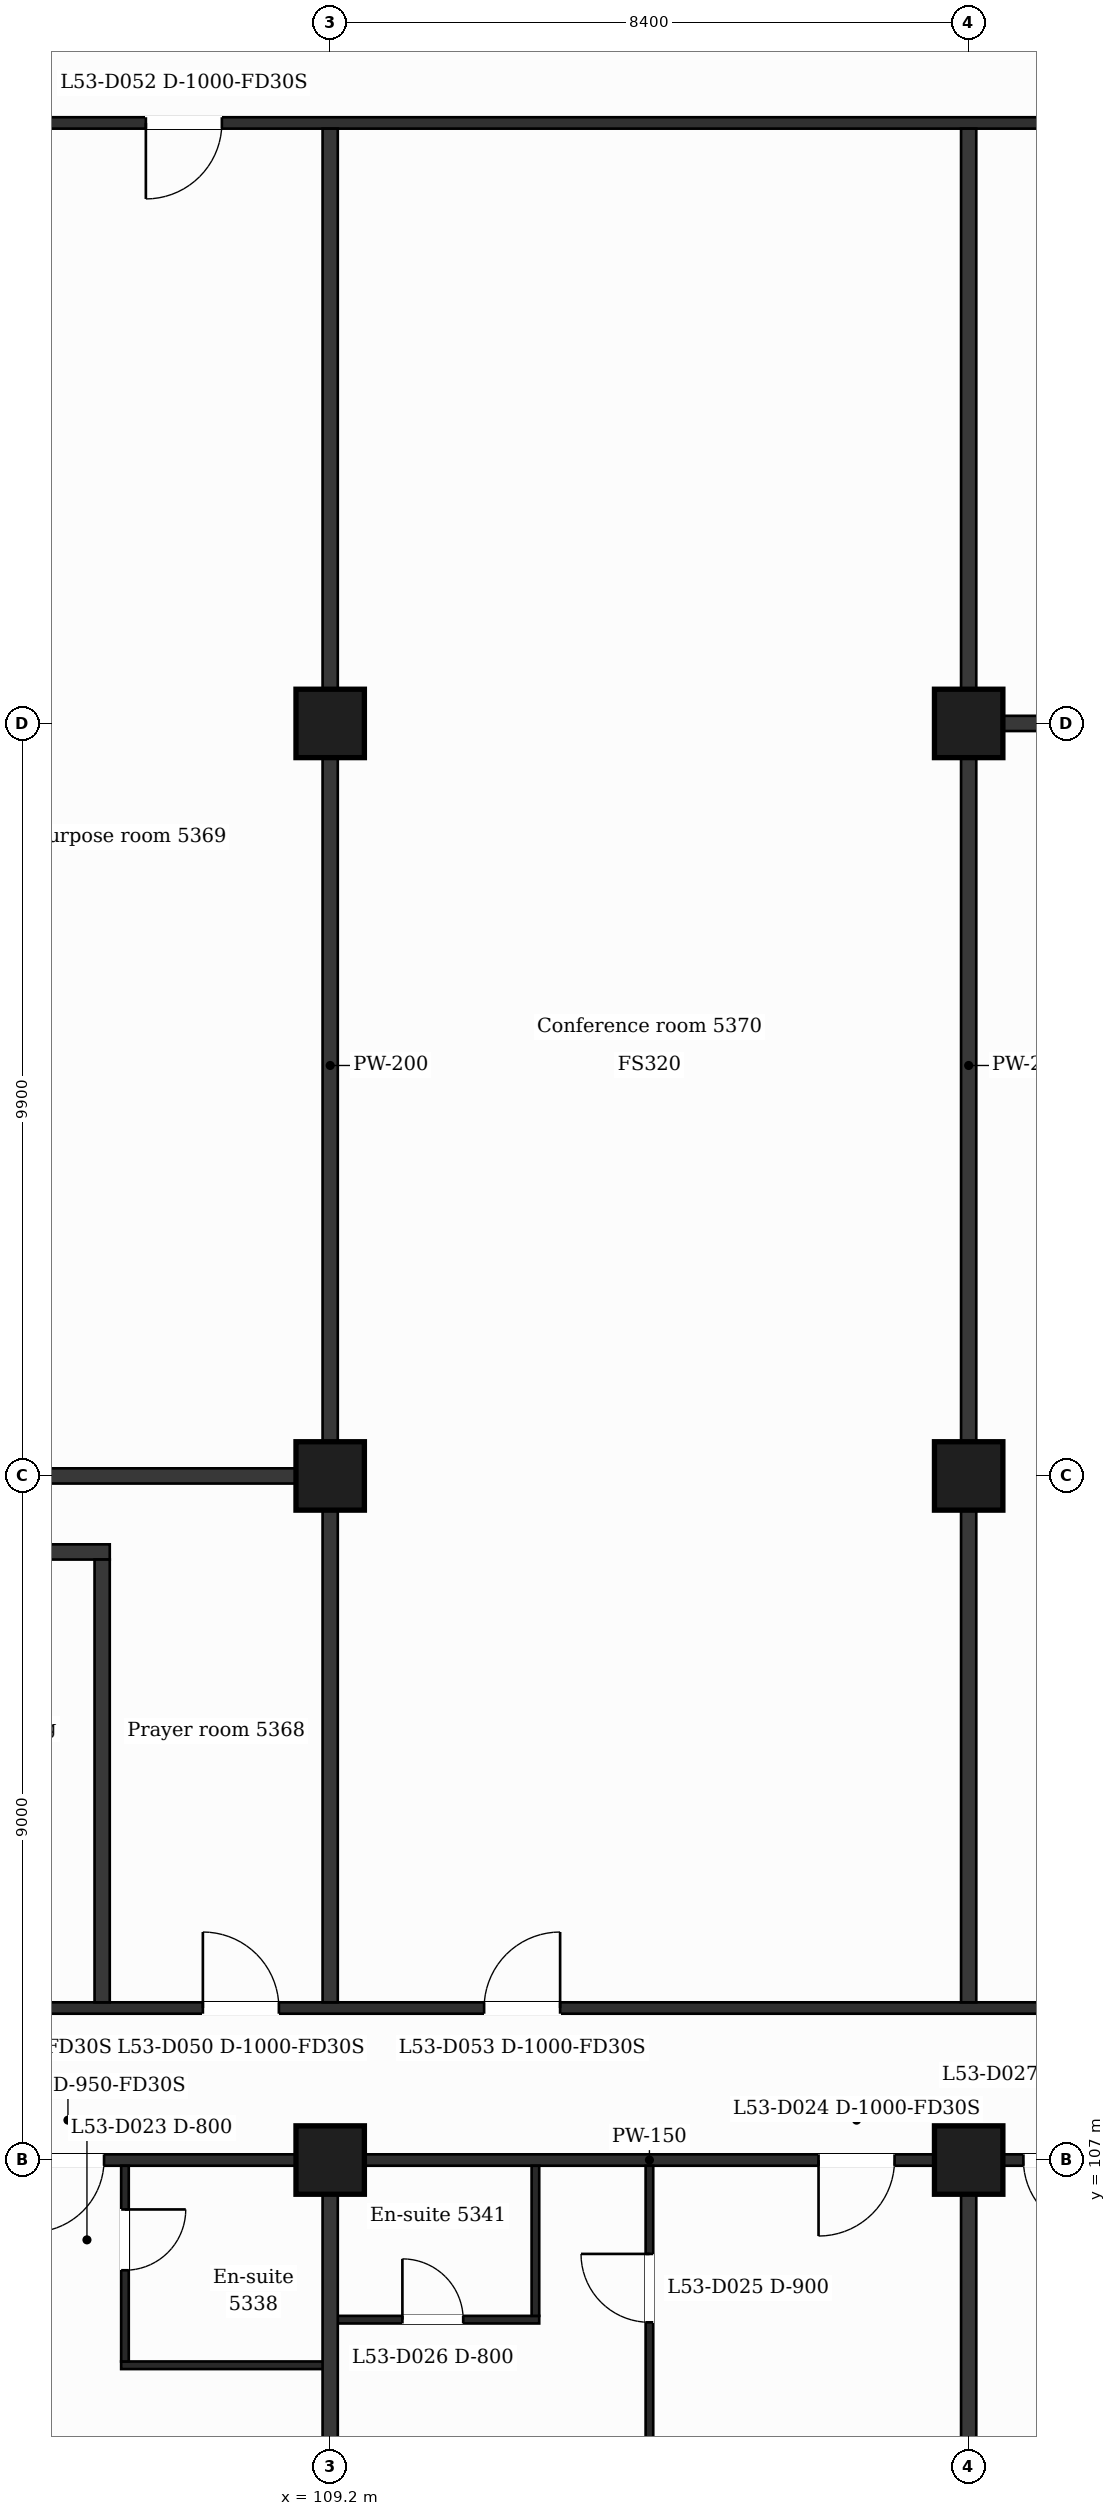
"""IFC4 building model, lengths in metres.
Left out: names, types, materials, properties, quantities, classifications, styles, units other than length and angle.
Written with IfcOpenShell. Run it as: python <this file> out.ifc"""

import sys

from ifc_helpers import new_model, si_unit, direction, frame, frame_2d, origin, origin_2d, place, context, subcontext, project, spatial, rectangle, extrude, element, fill, save


model = new_model("IFC4")
c1 = context("Model", 3, precision=1e-05, world=origin(), true_north=direction((0.0, 1.0)))
c2 = subcontext(c1, "Body", "Model", "MODEL_VIEW")
j1 = project(units=[si_unit("LENGTHUNIT", "METRE"), si_unit("PLANEANGLEUNIT", "RADIAN")], contexts=[c1])
p1 = place(None, origin())
s1 = spatial("IfcSite", under=j1, at=p1, CompositionType="ELEMENT")
p2 = place(p1, origin())
s2 = spatial("IfcBuilding", under=s1, at=p2, CompositionType="ELEMENT")
p3 = place(p2, frame((0.0, 0.0, 220.7)))
s3 = spatial("IfcBuildingStorey", under=s2, at=p3, CompositionType="ELEMENT", Elevation=220.7)
for number, where, z_axis, x_axis in (
    (1, (109.2, 107.0, 0.0), (0.0, 0.0, 1.0), (1.0, 0.0, 0.0)),
    (2, (117.6, 107.0, 0.0), (0.0, 0.0, 1.0), (1.0, 0.0, 0.0)),
    (3, (109.2, 116.0, 0.0), (0.0, 0.0, 1.0), (1.0, 0.0, 0.0)),
    (4, (117.6, 116.0, 0.0), (0.0, 0.0, 1.0), (1.0, 0.0, 0.0)),
    (5, (109.2, 125.9, 0.0), (0.0, 0.0, 1.0), (1.0, 0.0, 0.0)),
    (6, (117.6, 125.9, 0.0), (0.0, 0.0, 1.0), (1.0, 0.0, 0.0)),
):
    element("IfcColumn", number, at=place(p3, frame(where, z_axis=z_axis, x_axis=x_axis)), inside=s3, PredefinedType="COLUMN", context=c2, shape_type="SweptSolid", body=[
        extrude(rectangle(XDim=0.9, YDim=0.9, at=origin_2d()), origin(), (0.0, 0.0, 1.0), 3.7),
    ])
p4 = place(p3, frame((106.45, 104.3, 0.0), z_axis=(0.0, 0.0, 1.0), x_axis=(1.0, 0.0, 0.0)))
e7 = element("IfcWall", 7, at=p4, inside=s3, PredefinedType="PARTITIONING", context=c2, shape_type="SweptSolid", body=[
    extrude(rectangle(XDim=2.75, YDim=0.1, at=frame_2d((1.375, 0.0))), origin(), (0.0, 0.0, 1.0), 3.38),
])
p5 = place(p3, frame((109.2, 104.9, 0.0), z_axis=(0.0, 0.0, 1.0), x_axis=(1.0, 0.0, 0.0)))
e8 = element("IfcWall", 8, at=p5, inside=s3, PredefinedType="PARTITIONING", context=c2, shape_type="SweptSolid", body=[
    extrude(rectangle(XDim=2.75, YDim=0.1, at=frame_2d((1.375, 0.0))), origin(), (0.0, 0.0, 1.0), 3.38),
])
p6 = place(p5, frame((0.95, 0.0, 0.0)))
e9 = element("IfcOpeningElement", 9, at=p6, cuts=e8, PredefinedType="OPENING", context=c2, shape_type="SweptSolid", body=[
    extrude(rectangle(XDim=0.8, YDim=2.1, at=frame_2d((0.4, 1.05))), frame((0.0, 0.06, 0.0), z_axis=(0.0, -1.0, 0.0), x_axis=(1.0, 0.0, 0.0)), (0.0, 0.0, 1.0), 0.12),
])
p7 = place(p3, frame((87.018, 107.0, 0.0), z_axis=(0.0, 0.0, 1.0), x_axis=(1.0, 0.0, 0.0)))
e10 = element("IfcWall", 10, at=p7, inside=s3, PredefinedType="PARTITIONING", context=c2, shape_type="SweptSolid", body=[
    extrude(rectangle(XDim=52.765, YDim=0.15, at=frame_2d((26.382, 0.0))), origin(), (0.0, 0.0, 1.0), 3.38),
])
p8 = place(p7, frame((0.707, 0.0, 0.0)))
e11 = element("IfcOpeningElement", 11, at=p8, cuts=e10, PredefinedType="OPENING", context=c2, shape_type="SweptSolid", body=[
    extrude(rectangle(XDim=0.95, YDim=2.1, at=frame_2d((0.475, 1.05))), frame((0.0, 0.085, 0.0), z_axis=(0.0, -1.0, 0.0), x_axis=(1.0, 0.0, 0.0)), (0.0, 0.0, 1.0), 0.17),
])
p9 = place(p7, frame((6.894, 0.0, 0.0)))
e12 = element("IfcOpeningElement", 12, at=p9, cuts=e10, PredefinedType="OPENING", context=c2, shape_type="SweptSolid", body=[
    extrude(rectangle(XDim=0.95, YDim=2.1, at=frame_2d((0.475, 1.05))), frame((0.0, 0.085, 0.0), z_axis=(0.0, -1.0, 0.0), x_axis=(1.0, 0.0, 0.0)), (0.0, 0.0, 1.0), 0.17),
])
p10 = place(p7, frame((15.662, 0.0, 0.0)))
e13 = element("IfcOpeningElement", 13, at=p10, cuts=e10, PredefinedType="OPENING", context=c2, shape_type="SweptSolid", body=[
    extrude(rectangle(XDim=0.95, YDim=2.1, at=frame_2d((0.475, 1.05))), frame((0.0, 0.085, 0.0), z_axis=(0.0, -1.0, 0.0), x_axis=(1.0, 0.0, 0.0)), (0.0, 0.0, 1.0), 0.17),
])
p11 = place(p7, frame((18.257, 0.0, 0.0)))
e14 = element("IfcOpeningElement", 14, at=p11, cuts=e10, PredefinedType="OPENING", context=c2, shape_type="SweptSolid", body=[
    extrude(rectangle(XDim=0.95, YDim=2.1, at=frame_2d((0.475, 1.05))), frame((0.0, 0.085, 0.0), z_axis=(0.0, -1.0, 0.0), x_axis=(1.0, 0.0, 0.0)), (0.0, 0.0, 1.0), 0.17),
])
p12 = place(p7, frame((28.607, 0.0, 0.0)))
e15 = element("IfcOpeningElement", 15, at=p12, cuts=e10, PredefinedType="OPENING", context=c2, shape_type="SweptSolid", body=[
    extrude(rectangle(XDim=1.0, YDim=2.1, at=frame_2d((0.5, 1.05))), frame((0.0, 0.085, 0.0), z_axis=(0.0, -1.0, 0.0), x_axis=(1.0, 0.0, 0.0)), (0.0, 0.0, 1.0), 0.17),
])
p13 = place(p7, frame((31.302, 0.0, 0.0)))
e16 = element("IfcOpeningElement", 16, at=p13, cuts=e10, PredefinedType="OPENING", context=c2, shape_type="SweptSolid", body=[
    extrude(rectangle(XDim=0.95, YDim=2.1, at=frame_2d((0.475, 1.05))), frame((0.0, 0.085, 0.0), z_axis=(0.0, -1.0, 0.0), x_axis=(1.0, 0.0, 0.0)), (0.0, 0.0, 1.0), 0.17),
])
p14 = place(p7, frame((35.057, 0.0, 0.0)))
e17 = element("IfcOpeningElement", 17, at=p14, cuts=e10, PredefinedType="OPENING", context=c2, shape_type="SweptSolid", body=[
    extrude(rectangle(XDim=0.95, YDim=2.1, at=frame_2d((0.475, 1.05))), frame((0.0, 0.085, 0.0), z_axis=(0.0, -1.0, 0.0), x_axis=(1.0, 0.0, 0.0)), (0.0, 0.0, 1.0), 0.17),
])
p15 = place(p7, frame((41.957, 0.0, 0.0)))
e18 = element("IfcOpeningElement", 18, at=p15, cuts=e10, PredefinedType="OPENING", context=c2, shape_type="SweptSolid", body=[
    extrude(rectangle(XDim=0.95, YDim=2.1, at=frame_2d((0.475, 1.05))), frame((0.0, 0.085, 0.0), z_axis=(0.0, -1.0, 0.0), x_axis=(1.0, 0.0, 0.0)), (0.0, 0.0, 1.0), 0.17),
])
p16 = place(p7, frame((45.712, 0.0, 0.0)))
e19 = element("IfcOpeningElement", 19, at=p16, cuts=e10, PredefinedType="OPENING", context=c2, shape_type="SweptSolid", body=[
    extrude(rectangle(XDim=1.0, YDim=2.1, at=frame_2d((0.5, 1.05))), frame((0.0, 0.085, 0.0), z_axis=(0.0, -1.0, 0.0), x_axis=(1.0, 0.0, 0.0)), (0.0, 0.0, 1.0), 0.17),
])
p17 = place(p7, frame((48.974, 0.0, 0.0)))
e20 = element("IfcOpeningElement", 20, at=p17, cuts=e10, PredefinedType="OPENING", context=c2, shape_type="SweptSolid", body=[
    extrude(rectangle(XDim=0.95, YDim=2.1, at=frame_2d((0.475, 1.05))), frame((0.0, 0.085, 0.0), z_axis=(0.0, -1.0, 0.0), x_axis=(1.0, 0.0, 0.0)), (0.0, 0.0, 1.0), 0.17),
])
p18 = place(p3, frame((100.725, 109.0, 0.0), z_axis=(0.0, 0.0, 1.0), x_axis=(1.0, 0.0, 0.0)))
e21 = element("IfcWall", 21, at=p18, inside=s3, PredefinedType="PARTITIONING", context=c2, shape_type="SweptSolid", body=[
    extrude(rectangle(XDim=25.35, YDim=0.15, at=frame_2d((12.675, 0.0))), origin(), (0.0, 0.0, 1.0), 3.38),
])
p19 = place(p18, frame((6.8, 0.0, 0.0)))
e22 = element("IfcOpeningElement", 22, at=p19, cuts=e21, PredefinedType="OPENING", context=c2, shape_type="SweptSolid", body=[
    extrude(rectangle(XDim=1.0, YDim=2.1, at=frame_2d((0.5, 1.05))), frame((0.0, 0.085, 0.0), z_axis=(0.0, -1.0, 0.0), x_axis=(1.0, 0.0, 0.0)), (0.0, 0.0, 1.0), 0.17),
])
p20 = place(p18, frame((3.475, 0.0, 0.0)))
e23 = element("IfcOpeningElement", 23, at=p20, cuts=e21, PredefinedType="OPENING", context=c2, shape_type="SweptSolid", body=[
    extrude(rectangle(XDim=1.0, YDim=2.1, at=frame_2d((0.5, 1.05))), frame((0.0, 0.085, 0.0), z_axis=(0.0, -1.0, 0.0), x_axis=(1.0, 0.0, 0.0)), (0.0, 0.0, 1.0), 0.17),
])
p21 = place(p18, frame((10.5, 0.0, 0.0)))
e24 = element("IfcOpeningElement", 24, at=p21, cuts=e21, PredefinedType="OPENING", context=c2, shape_type="SweptSolid", body=[
    extrude(rectangle(XDim=1.0, YDim=2.1, at=frame_2d((0.5, 1.05))), frame((0.0, 0.085, 0.0), z_axis=(0.0, -1.0, 0.0), x_axis=(1.0, 0.0, 0.0)), (0.0, 0.0, 1.0), 0.17),
])
p22 = place(p18, frame((19.375, 0.0, 0.0)))
e25 = element("IfcOpeningElement", 25, at=p22, cuts=e21, PredefinedType="OPENING", context=c2, shape_type="SweptSolid", body=[
    extrude(rectangle(XDim=1.0, YDim=2.1, at=frame_2d((0.5, 1.05))), frame((0.0, 0.085, 0.0), z_axis=(0.0, -1.0, 0.0), x_axis=(1.0, 0.0, 0.0)), (0.0, 0.0, 1.0), 0.17),
])
p23 = place(p3, frame((103.2, 115.0, 0.0), z_axis=(0.0, 0.0, 1.0), x_axis=(1.0, 0.0, 0.0)))
e26 = element("IfcWall", 26, at=p23, inside=s3, PredefinedType="PARTITIONING", context=c2, shape_type="SweptSolid", body=[
    extrude(rectangle(XDim=3.1, YDim=0.2, at=frame_2d((1.55, 0.0))), origin(), (0.0, 0.0, 1.0), 3.38),
])
for number, where, z_axis, x_axis in (
    (27, (103.2, 116.0, 0.0), (0.0, 0.0, 1.0), (1.0, 0.0, 0.0)),
    (28, (117.6, 125.9, 0.0), (0.0, 0.0, 1.0), (1.0, 0.0, 0.0)),
):
    element("IfcWall", number, at=place(p3, frame(where, z_axis=z_axis, x_axis=x_axis)), inside=s3, PredefinedType="PARTITIONING", context=c2, shape_type="SweptSolid", body=[
        extrude(rectangle(XDim=6.0, YDim=0.2, at=frame_2d((3.0, 0.0))), origin(), (0.0, 0.0, 1.0), 3.38),
    ])
p24 = place(p3, frame((100.725, 133.8, 0.0), z_axis=(0.0, 0.0, 1.0), x_axis=(1.0, 0.0, 0.0)))
e29 = element("IfcWall", 29, at=p24, inside=s3, PredefinedType="PARTITIONING", context=c2, shape_type="SweptSolid", body=[
    extrude(rectangle(XDim=25.35, YDim=0.15, at=frame_2d((12.675, 0.0))), origin(), (0.0, 0.0, 1.0), 3.38),
])
p25 = place(p24, frame((6.05, 0.0, 0.0)))
e30 = element("IfcOpeningElement", 30, at=p25, cuts=e29, PredefinedType="OPENING", context=c2, shape_type="SweptSolid", body=[
    extrude(rectangle(XDim=1.0, YDim=2.1, at=frame_2d((0.5, 1.05))), frame((0.0, 0.085, 0.0), z_axis=(0.0, -1.0, 0.0), x_axis=(1.0, 0.0, 0.0)), (0.0, 0.0, 1.0), 0.17),
])
p26 = place(p24, frame((19.375, 0.0, 0.0)))
e31 = element("IfcOpeningElement", 31, at=p26, cuts=e29, PredefinedType="OPENING", context=c2, shape_type="SweptSolid", body=[
    extrude(rectangle(XDim=1.0, YDim=2.1, at=frame_2d((0.5, 1.05))), frame((0.0, 0.085, 0.0), z_axis=(0.0, -1.0, 0.0), x_axis=(1.0, 0.0, 0.0)), (0.0, 0.0, 1.0), 0.17),
])
p27 = place(p3, frame((106.2, 109.075, 0.0), z_axis=(0.0, 0.0, 1.0), x_axis=(0.0, 1.0, 0.0)))
e32 = element("IfcWall", 32, at=p27, inside=s3, PredefinedType="PARTITIONING", context=c2, shape_type="SweptSolid", body=[
    extrude(rectangle(XDim=5.825, YDim=0.2, at=frame_2d((2.913, 0.0))), origin(), (0.0, 0.0, 1.0), 3.38),
])
p28 = place(p3, frame((106.5, 104.35, 0.0), z_axis=(0.0, 0.0, 1.0), x_axis=(0.0, 1.0, 0.0)))
e33 = element("IfcWall", 33, at=p28, inside=s3, PredefinedType="PARTITIONING", context=c2, shape_type="SweptSolid", body=[
    extrude(rectangle(XDim=2.575, YDim=0.1, at=frame_2d((1.288, 0.0))), origin(), (0.0, 0.0, 1.0), 3.38),
])
p29 = place(p28, frame((1.2, 0.0, 0.0)))
e34 = element("IfcOpeningElement", 34, at=p29, cuts=e33, PredefinedType="OPENING", context=c2, shape_type="SweptSolid", body=[
    extrude(rectangle(XDim=0.8, YDim=2.1, at=frame_2d((0.4, 1.05))), frame((0.0, 0.06, 0.0), z_axis=(0.0, -1.0, 0.0), x_axis=(1.0, 0.0, 0.0)), (0.0, 0.0, 1.0), 0.12),
])
p30 = place(p3, frame((109.2, 99.79, 0.0), z_axis=(0.0, 0.0, 1.0), x_axis=(0.0, 1.0, 0.0)))
e35 = element("IfcWall", 35, at=p30, inside=s3, PredefinedType="PARTITIONING", context=c2, shape_type="SweptSolid", body=[
    extrude(rectangle(XDim=7.135, YDim=0.2, at=frame_2d((3.567, 0.0))), origin(), (0.0, 0.0, 1.0), 3.38),
])
p31 = place(p3, frame((109.2, 109.075, 0.0), z_axis=(0.0, 0.0, 1.0), x_axis=(0.0, 1.0, 0.0)))
e36 = element("IfcWall", 36, at=p31, inside=s3, PredefinedType="PARTITIONING", context=c2, shape_type="SweptSolid", body=[
    extrude(rectangle(XDim=24.65, YDim=0.2, at=frame_2d((12.325, 0.0))), origin(), (0.0, 0.0, 1.0), 3.38),
])
p32 = place(p3, frame((111.9, 104.95, 0.0), z_axis=(0.0, 0.0, 1.0), x_axis=(0.0, 1.0, 0.0)))
e37 = element("IfcWall", 37, at=p32, inside=s3, PredefinedType="PARTITIONING", context=c2, shape_type="SweptSolid", body=[
    extrude(rectangle(XDim=1.975, YDim=0.1, at=frame_2d((0.988, 0.0))), origin(), (0.0, 0.0, 1.0), 3.38),
])
p33 = place(p3, frame((113.4, 99.79, 0.0), z_axis=(0.0, 0.0, 1.0), x_axis=(0.0, 1.0, 0.0)))
e38 = element("IfcWall", 38, at=p33, inside=s3, PredefinedType="PARTITIONING", context=c2, shape_type="SweptSolid", body=[
    extrude(rectangle(XDim=7.135, YDim=0.1, at=frame_2d((3.567, 0.0))), origin(), (0.0, 0.0, 1.0), 3.38),
])
p34 = place(p33, frame((5.075, 0.0, 0.0)))
e39 = element("IfcOpeningElement", 39, at=p34, cuts=e38, PredefinedType="OPENING", context=c2, shape_type="SweptSolid", body=[
    extrude(rectangle(XDim=0.9, YDim=2.1, at=frame_2d((0.45, 1.05))), frame((0.0, 0.06, 0.0), z_axis=(0.0, -1.0, 0.0), x_axis=(1.0, 0.0, 0.0)), (0.0, 0.0, 1.0), 0.12),
])
p35 = place(p3, frame((117.6, 99.79, 0.0), z_axis=(0.0, 0.0, 1.0), x_axis=(0.0, 1.0, 0.0)))
e40 = element("IfcWall", 40, at=p35, inside=s3, PredefinedType="PARTITIONING", context=c2, shape_type="SweptSolid", body=[
    extrude(rectangle(XDim=7.135, YDim=0.2, at=frame_2d((3.567, 0.0))), origin(), (0.0, 0.0, 1.0), 3.38),
])
p36 = place(p3, frame((117.6, 109.075, 0.0), z_axis=(0.0, 0.0, 1.0), x_axis=(0.0, 1.0, 0.0)))
e41 = element("IfcWall", 41, at=p36, inside=s3, PredefinedType="PARTITIONING", context=c2, shape_type="SweptSolid", body=[
    extrude(rectangle(XDim=24.65, YDim=0.2, at=frame_2d((12.325, 0.0))), origin(), (0.0, 0.0, 1.0), 3.38),
])
p37 = place(p11, origin())
e42 = element("IfcDoor", 42, at=p37, inside=s3, OperationType="SINGLE_SWING_LEFT", PredefinedType="DOOR", context=c2, shape_type="SweptSolid", body=[
    extrude(rectangle(XDim=0.95, YDim=2.1, at=frame_2d((0.475, 1.05))), frame((0.0, 0.025, 0.0), z_axis=(0.0, -1.0, 0.0), x_axis=(1.0, 0.0, 0.0)), (0.0, 0.0, 1.0), 0.05),
])
fill(e14, e42)
p38 = place(p29, origin())
e43 = element("IfcDoor", 43, at=p38, inside=s3, OperationType="SINGLE_SWING_RIGHT", PredefinedType="DOOR", context=c2, shape_type="SweptSolid", body=[
    extrude(rectangle(XDim=0.8, YDim=2.1, at=frame_2d((0.4, 1.05))), frame((0.0, 0.025, 0.0), z_axis=(0.0, -1.0, 0.0), x_axis=(1.0, 0.0, 0.0)), (0.0, 0.0, 1.0), 0.05),
])
fill(e34, e43)
p39 = place(p12, origin())
e44 = element("IfcDoor", 44, at=p39, inside=s3, OperationType="SINGLE_SWING_LEFT", PredefinedType="DOOR", context=c2, shape_type="SweptSolid", body=[
    extrude(rectangle(XDim=1.0, YDim=2.1, at=frame_2d((0.5, 1.05))), frame((0.0, 0.025, 0.0), z_axis=(0.0, -1.0, 0.0), x_axis=(1.0, 0.0, 0.0)), (0.0, 0.0, 1.0), 0.05),
])
fill(e15, e44)
p40 = place(p34, origin())
e45 = element("IfcDoor", 45, at=p40, inside=s3, OperationType="SINGLE_SWING_RIGHT", PredefinedType="DOOR", context=c2, shape_type="SweptSolid", body=[
    extrude(rectangle(XDim=0.9, YDim=2.1, at=frame_2d((0.45, 1.05))), frame((0.0, 0.025, 0.0), z_axis=(0.0, -1.0, 0.0), x_axis=(1.0, 0.0, 0.0)), (0.0, 0.0, 1.0), 0.05),
])
fill(e39, e45)
p41 = place(p6, origin())
e46 = element("IfcDoor", 46, at=p41, inside=s3, OperationType="SINGLE_SWING_LEFT", PredefinedType="DOOR", context=c2, shape_type="SweptSolid", body=[
    extrude(rectangle(XDim=0.8, YDim=2.1, at=frame_2d((0.4, 1.05))), frame((0.0, 0.025, 0.0), z_axis=(0.0, -1.0, 0.0), x_axis=(1.0, 0.0, 0.0)), (0.0, 0.0, 1.0), 0.05),
])
fill(e9, e46)
p42 = place(p13, origin())
e47 = element("IfcDoor", 47, at=p42, inside=s3, OperationType="SINGLE_SWING_RIGHT", PredefinedType="DOOR", context=c2, shape_type="SweptSolid", body=[
    extrude(rectangle(XDim=0.95, YDim=2.1, at=frame_2d((0.475, 1.05))), frame((0.0, 0.025, 0.0), z_axis=(0.0, -1.0, 0.0), x_axis=(1.0, 0.0, 0.0)), (0.0, 0.0, 1.0), 0.05),
])
fill(e16, e47)
p43 = place(p19, origin())
e48 = element("IfcDoor", 48, at=p43, inside=s3, OperationType="SINGLE_SWING_LEFT", PredefinedType="DOOR", context=c2, shape_type="SweptSolid", body=[
    extrude(rectangle(XDim=1.0, YDim=2.1, at=frame_2d((0.5, 1.05))), frame((0.0, 0.025, 0.0), z_axis=(0.0, -1.0, 0.0), x_axis=(1.0, 0.0, 0.0)), (0.0, 0.0, 1.0), 0.05),
])
fill(e22, e48)
p44 = place(p25, origin())
e49 = element("IfcDoor", 49, at=p44, inside=s3, OperationType="SINGLE_SWING_LEFT", PredefinedType="DOOR", context=c2, shape_type="SweptSolid", body=[
    extrude(rectangle(XDim=1.0, YDim=2.1, at=frame_2d((0.5, 1.05))), frame((0.0, 0.025, 0.0), z_axis=(0.0, -1.0, 0.0), x_axis=(1.0, 0.0, 0.0)), (0.0, 0.0, 1.0), 0.05),
])
fill(e30, e49)
p45 = place(p21, origin())
e50 = element("IfcDoor", 50, at=p45, inside=s3, OperationType="SINGLE_SWING_RIGHT", PredefinedType="DOOR", context=c2, shape_type="SweptSolid", body=[
    extrude(rectangle(XDim=1.0, YDim=2.1, at=frame_2d((0.5, 1.05))), frame((0.0, 0.025, 0.0), z_axis=(0.0, -1.0, 0.0), x_axis=(1.0, 0.0, 0.0)), (0.0, 0.0, 1.0), 0.05),
])
fill(e24, e50)
save(model, sys.argv[1])
